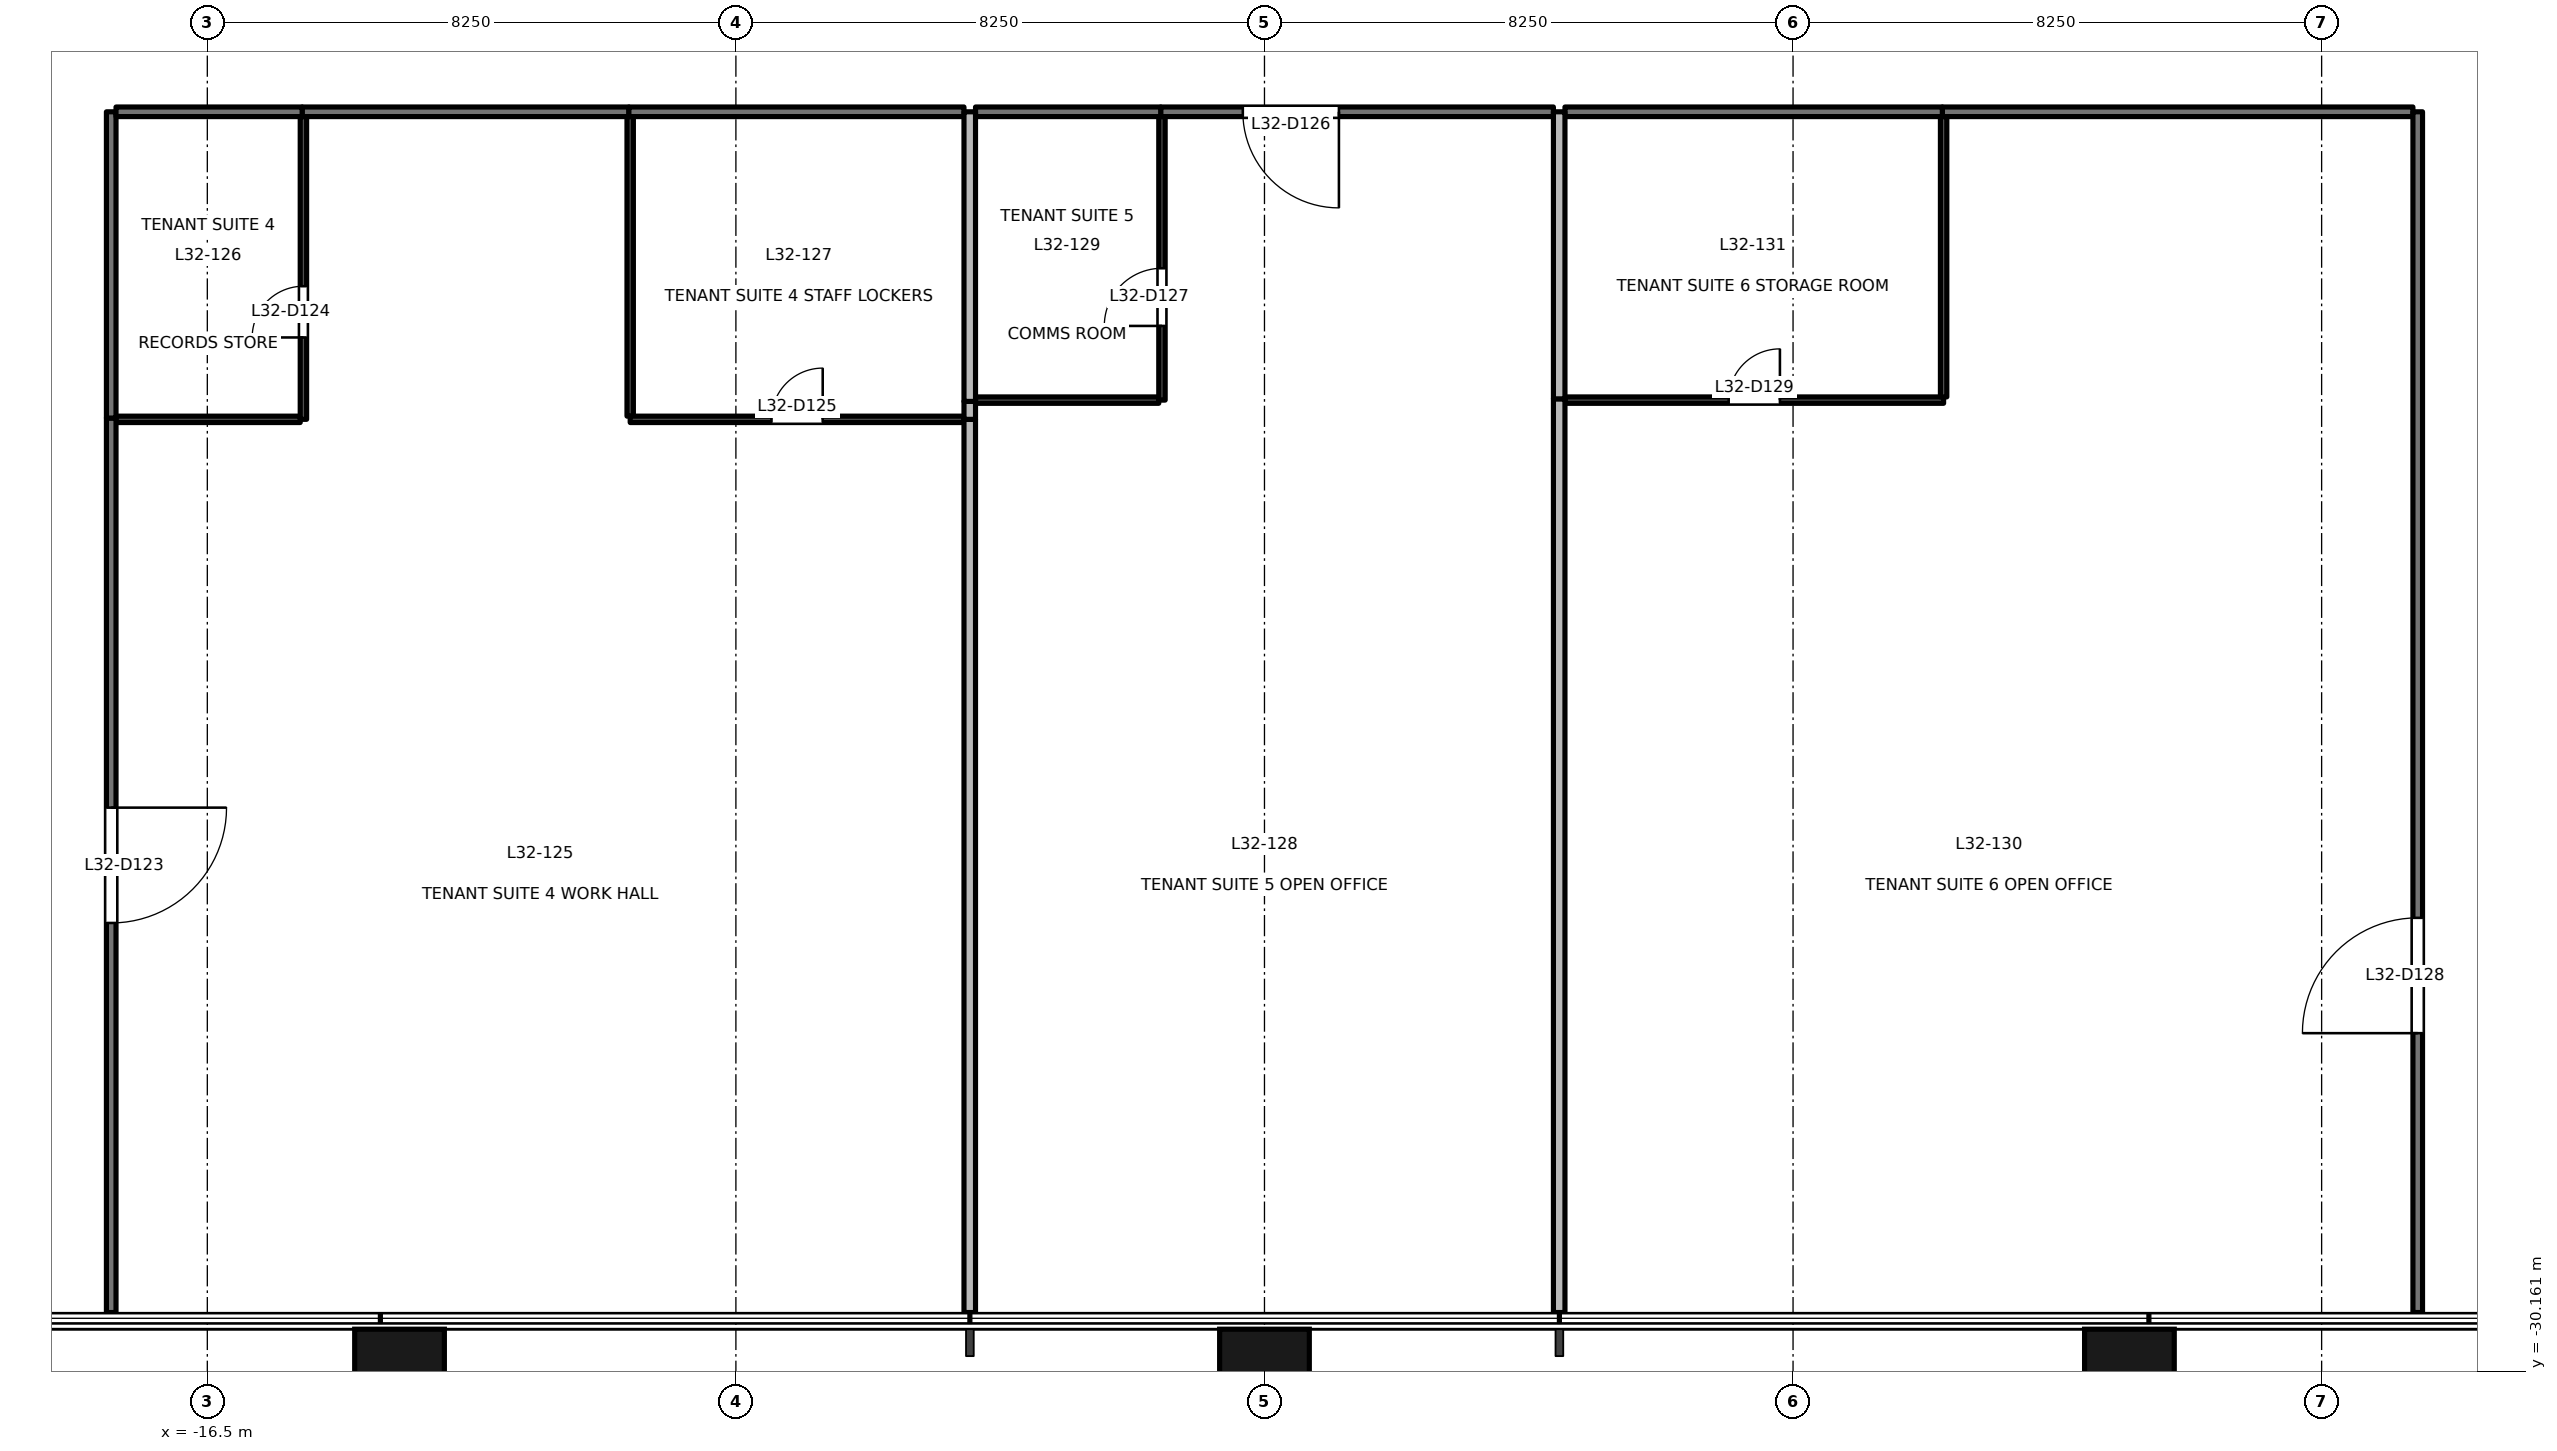
"""IFC4 building model, lengths in metres.
Left out: names, types, materials, properties, quantities, classifications, styles, units other than length and angle.
Written with IfcOpenShell. Run it as: python <this file> out.ifc"""

import sys

from ifc_helpers import new_model, si_unit, direction, frame, frame_2d, origin, origin_2d, place, context, subcontext, project, spatial, rectangle, extrude, element, fill, save


model = new_model("IFC4")
c1 = context("Model", 3, precision=1e-05, world=origin(), true_north=direction((0.0, 1.0)))
c2 = subcontext(c1, "Body", "Model", "MODEL_VIEW")
j1 = project(units=[si_unit("LENGTHUNIT", "METRE"), si_unit("PLANEANGLEUNIT", "RADIAN")], contexts=[c1])
p1 = place(None, origin())
s1 = spatial("IfcSite", under=j1, at=p1, CompositionType="ELEMENT")
p2 = place(p1, origin())
s2 = spatial("IfcBuilding", under=s1, at=p2, CompositionType="ELEMENT")
p3 = place(p2, frame((0.0, 0.0, 142.1)))
s3 = spatial("IfcBuildingStorey", under=s2, at=p3, CompositionType="ELEMENT", Elevation=142.1)
for number, where, z_axis, x_axis in (
    (1, (-13.5, -30.4, -0.2), (0.0, 0.0, 1.0), (1.0, 0.0, 0.0)),
    (2, (0.0, -30.4, -0.2), (0.0, 0.0, 1.0), (1.0, 0.0, 0.0)),
    (3, (13.5, -30.4, -0.2), (0.0, 0.0, 1.0), (1.0, 0.0, 0.0)),
):
    element("IfcColumn", number, at=place(p3, frame(where, z_axis=z_axis, x_axis=x_axis)), inside=s3, PredefinedType="COLUMN", context=c2, shape_type="SweptSolid", body=[
        extrude(rectangle(XDim=1.4, YDim=1.8, at=origin_2d()), origin(), (0.0, 0.0, 1.0), 4.0),
    ])
p4 = place(p3, frame((-18.0, -15.28, 0.0), z_axis=(0.0, 0.0, 1.0), x_axis=(0.0, -1.0, 0.0)))
e4 = element("IfcWall", 4, at=p4, inside=s3, PredefinedType="PARTITIONING", context=c2, shape_type="SweptSolid", body=[
    extrude(rectangle(XDim=13.96, YDim=0.15, at=frame_2d((6.98, 0.0))), origin(), (0.0, 0.0, 1.0), 3.8),
])
p5 = place(p4, frame((6.08, 0.0, 0.0)))
e5 = element("IfcOpeningElement", 5, at=p5, cuts=e4, PredefinedType="OPENING", context=c2, shape_type="SweptSolid", body=[
    extrude(rectangle(XDim=1.8, YDim=2.1, at=frame_2d((0.9, 1.05))), frame((0.0, 0.085, 0.0), z_axis=(0.0, -1.0, 0.0), x_axis=(1.0, 0.0, 0.0)), (0.0, 0.0, 1.0), 0.171),
])
p6 = place(p3, frame((-9.92, -10.5, 0.0), z_axis=(0.0, 0.0, 1.0), x_axis=(-1.0, 0.0, 0.0)))
e6 = element("IfcWall", 6, at=p6, inside=s3, PredefinedType="PARTITIONING", context=c2, shape_type="SweptSolid", body=[
    extrude(rectangle(XDim=5.1, YDim=0.15, at=frame_2d((2.55, 0.0))), origin(), (0.0, 0.0, 1.0), 2.9),
])
p7 = place(p3, frame((-18.0, -10.5, 0.0), z_axis=(0.0, 0.0, 1.0), x_axis=(0.0, -1.0, 0.0)))
e7 = element("IfcWall", 7, at=p7, inside=s3, PredefinedType="PARTITIONING", context=c2, shape_type="SweptSolid", body=[
    extrude(rectangle(XDim=4.78, YDim=0.15, at=frame_2d((2.39, 0.0))), origin(), (0.0, 0.0, 1.0), 3.8),
])
p8 = place(p3, frame((-15.02, -10.5, 0.0), z_axis=(0.0, 0.0, 1.0), x_axis=(-1.0, 0.0, 0.0)))
e8 = element("IfcWall", 8, at=p8, inside=s3, PredefinedType="PARTITIONING", context=c2, shape_type="SweptSolid", body=[
    extrude(rectangle(XDim=2.905, YDim=0.15, at=frame_2d((1.453, 0.0))), origin(), (0.0, 0.0, 1.0), 3.8),
])
p9 = place(p3, frame((-4.69, -10.5, 0.0), z_axis=(0.0, 0.0, 1.0), x_axis=(-1.0, 0.0, 0.0)))
e9 = element("IfcWall", 9, at=p9, inside=s3, PredefinedType="PARTITIONING", context=c2, shape_type="SweptSolid", body=[
    extrude(rectangle(XDim=5.23, YDim=0.15, at=frame_2d((2.615, 0.0))), origin(), (0.0, 0.0, 1.0), 2.9),
])
p10 = place(p3, frame((4.51, -10.5, 0.0), z_axis=(0.0, 0.0, 1.0), x_axis=(-1.0, 0.0, 0.0)))
e10 = element("IfcWall", 10, at=p10, inside=s3, PredefinedType="PARTITIONING", context=c2, shape_type="SweptSolid", body=[
    extrude(rectangle(XDim=6.13, YDim=0.15, at=frame_2d((3.065, 0.0))), origin(), (0.0, 0.0, 1.0), 2.9),
])
p11 = place(p10, frame((3.348, 0.0, 0.0)))
e11 = element("IfcOpeningElement", 11, at=p11, cuts=e10, PredefinedType="OPENING", context=c2, shape_type="SweptSolid", body=[
    extrude(rectangle(XDim=1.5, YDim=2.1, at=frame_2d((0.75, 1.05))), frame((0.0, 0.085, 0.0), z_axis=(0.0, -1.0, 0.0), x_axis=(1.0, 0.0, 0.0)), (0.0, 0.0, 1.0), 0.171),
])
p12 = place(p3, frame((-1.62, -10.5, 0.0), z_axis=(0.0, 0.0, 1.0), x_axis=(-1.0, 0.0, 0.0)))
e12 = element("IfcWall", 12, at=p12, inside=s3, PredefinedType="PARTITIONING", context=c2, shape_type="SweptSolid", body=[
    extrude(rectangle(XDim=2.89, YDim=0.15, at=frame_2d((1.445, 0.0))), origin(), (0.0, 0.0, 1.0), 2.9),
])
p13 = place(p3, frame((17.925, -10.5, 0.0), z_axis=(0.0, 0.0, 1.0), x_axis=(-1.0, 0.0, 0.0)))
e13 = element("IfcWall", 13, at=p13, inside=s3, PredefinedType="PARTITIONING", context=c2, shape_type="SweptSolid", body=[
    extrude(rectangle(XDim=7.345, YDim=0.15, at=frame_2d((3.672, 0.0))), origin(), (0.0, 0.0, 1.0), 2.9),
])
p14 = place(p3, frame((18.0, -29.24, 0.0), z_axis=(0.0, 0.0, 1.0), x_axis=(0.0, 1.0, 0.0)))
e14 = element("IfcWall", 14, at=p14, inside=s3, PredefinedType="PARTITIONING", context=c2, shape_type="SweptSolid", body=[
    extrude(rectangle(XDim=18.74, YDim=0.15, at=frame_2d((9.37, 0.0))), origin(), (0.0, 0.0, 1.0), 3.8),
])
p15 = place(p14, frame((4.36, 0.0, 0.0)))
e15 = element("IfcOpeningElement", 15, at=p15, cuts=e14, PredefinedType="OPENING", context=c2, shape_type="SweptSolid", body=[
    extrude(rectangle(XDim=1.8, YDim=2.1, at=frame_2d((0.9, 1.05))), frame((0.0, 0.085, 0.0), z_axis=(0.0, -1.0, 0.0), x_axis=(1.0, 0.0, 0.0)), (0.0, 0.0, 1.0), 0.171),
])
p16 = place(p3, frame((10.58, -10.5, 0.0), z_axis=(0.0, 0.0, 1.0), x_axis=(-1.0, 0.0, 0.0)))
e16 = element("IfcWall", 16, at=p16, inside=s3, PredefinedType="PARTITIONING", context=c2, shape_type="SweptSolid", body=[
    extrude(rectangle(XDim=5.89, YDim=0.15, at=frame_2d((2.945, 0.0))), origin(), (0.0, 0.0, 1.0), 2.9),
])
p17 = place(p3, frame((-17.925, -15.3, 0.0), z_axis=(0.0, 0.0, 1.0), x_axis=(1.0, 0.0, 0.0)))
e17 = element("IfcWall", 17, at=p17, inside=s3, PredefinedType="PARTITIONING", context=c2, shape_type="SweptSolid", body=[
    extrude(rectangle(XDim=2.875, YDim=0.1, at=frame_2d((1.438, 0.0))), origin(), (0.0, 0.0, 1.0), 3.8),
])
p18 = place(p3, frame((-15.0, -15.3, 0.0), z_axis=(0.0, 0.0, 1.0), x_axis=(0.0, 1.0, 0.0)))
e18 = element("IfcWall", 18, at=p18, inside=s3, PredefinedType="PARTITIONING", context=c2, shape_type="SweptSolid", body=[
    extrude(rectangle(XDim=4.725, YDim=0.1, at=frame_2d((2.363, 0.0))), origin(), (0.0, 0.0, 1.0), 3.8),
])
p19 = place(p18, frame((1.278, 0.0, 0.0)))
e19 = element("IfcOpeningElement", 19, at=p19, cuts=e18, PredefinedType="OPENING", context=c2, shape_type="SweptSolid", body=[
    extrude(rectangle(XDim=0.8, YDim=2.1, at=frame_2d((0.4, 1.05))), frame((0.0, 0.061, 0.0), z_axis=(0.0, -1.0, 0.0), x_axis=(1.0, 0.0, 0.0)), (0.0, 0.0, 1.0), 0.121),
])
p20 = place(p3, frame((-9.9, -10.575, 0.0), z_axis=(0.0, 0.0, 1.0), x_axis=(0.0, -1.0, 0.0)))
e20 = element("IfcWall", 20, at=p20, inside=s3, PredefinedType="PARTITIONING", context=c2, shape_type="SweptSolid", body=[
    extrude(rectangle(XDim=4.675, YDim=0.1, at=frame_2d((2.337, 0.0))), origin(), (0.0, 0.0, 1.0), 3.8),
])
p21 = place(p3, frame((-9.9, -15.3, 0.0), z_axis=(0.0, 0.0, 1.0), x_axis=(1.0, 0.0, 0.0)))
e21 = element("IfcWall", 21, at=p21, inside=s3, PredefinedType="PARTITIONING", context=c2, shape_type="SweptSolid", body=[
    extrude(rectangle(XDim=5.21, YDim=0.1, at=frame_2d((2.605, 0.0))), origin(), (0.0, 0.0, 1.0), 2.9),
])
p22 = place(p21, frame((2.205, 0.0, 0.0)))
e22 = element("IfcOpeningElement", 22, at=p22, cuts=e21, PredefinedType="OPENING", context=c2, shape_type="SweptSolid", body=[
    extrude(rectangle(XDim=0.8, YDim=2.1, at=frame_2d((0.4, 1.05))), frame((0.0, 0.061, 0.0), z_axis=(0.0, -1.0, 0.0), x_axis=(1.0, 0.0, 0.0)), (0.0, 0.0, 1.0), 0.121),
])
p23 = place(p3, frame((-4.6, -15.3, 0.0), z_axis=(0.0, 0.0, 1.0), x_axis=(0.0, -1.0, 0.0)))
e23 = element("IfcWall", 23, at=p23, inside=s3, PredefinedType="PARTITIONING", context=c2, shape_type="SweptSolid", body=[
    extrude(rectangle(XDim=13.94, YDim=0.18, at=frame_2d((6.97, 0.0))), origin(), (0.0, 0.0, 1.0), 2.9),
])
p24 = place(p3, frame((-4.6, -15.02, 0.0), z_axis=(0.0, 0.0, 1.0), x_axis=(0.0, -1.0, 0.0)))
e24 = element("IfcWall", 24, at=p24, inside=s3, PredefinedType="PARTITIONING", context=c2, shape_type="SweptSolid", body=[
    extrude(rectangle(XDim=0.28, YDim=0.18, at=frame_2d((0.14, 0.0))), origin(), (0.0, 0.0, 1.0), 2.9),
])
p25 = place(p3, frame((-4.6, -10.5, 0.0), z_axis=(0.0, 0.0, 1.0), x_axis=(0.0, -1.0, 0.0)))
e25 = element("IfcWall", 25, at=p25, inside=s3, PredefinedType="PARTITIONING", context=c2, shape_type="SweptSolid", body=[
    extrude(rectangle(XDim=4.52, YDim=0.18, at=frame_2d((2.26, 0.0))), origin(), (0.0, 0.0, 1.0), 2.9),
])
p26 = place(p3, frame((-4.51, -15.0, 0.0), z_axis=(0.0, 0.0, 1.0), x_axis=(1.0, 0.0, 0.0)))
e26 = element("IfcWall", 26, at=p26, inside=s3, PredefinedType="PARTITIONING", context=c2, shape_type="SweptSolid", body=[
    extrude(rectangle(XDim=2.86, YDim=0.1, at=frame_2d((1.43, 0.0))), origin(), (0.0, 0.0, 1.0), 2.9),
])
p27 = place(p3, frame((-1.6, -15.0, 0.0), z_axis=(0.0, 0.0, 1.0), x_axis=(0.0, 1.0, 0.0)))
e27 = element("IfcWall", 27, at=p27, inside=s3, PredefinedType="PARTITIONING", context=c2, shape_type="SweptSolid", body=[
    extrude(rectangle(XDim=4.425, YDim=0.1, at=frame_2d((2.212, 0.0))), origin(), (0.0, 0.0, 1.0), 3.8),
])
p28 = place(p27, frame((1.158, 0.0, 0.0)))
e28 = element("IfcOpeningElement", 28, at=p28, cuts=e27, PredefinedType="OPENING", context=c2, shape_type="SweptSolid", body=[
    extrude(rectangle(XDim=0.9, YDim=2.1, at=frame_2d((0.45, 1.05))), frame((0.0, 0.061, 0.0), z_axis=(0.0, -1.0, 0.0), x_axis=(1.0, 0.0, 0.0)), (0.0, 0.0, 1.0), 0.121),
])
p29 = place(p3, frame((4.6, -14.98, 0.0), z_axis=(0.0, 0.0, 1.0), x_axis=(0.0, -1.0, 0.0)))
e29 = element("IfcWall", 29, at=p29, inside=s3, PredefinedType="PARTITIONING", context=c2, shape_type="SweptSolid", body=[
    extrude(rectangle(XDim=14.26, YDim=0.18, at=frame_2d((7.13, 0.0))), origin(), (0.0, 0.0, 1.0), 2.9),
])
p30 = place(p3, frame((4.6, -10.5, 0.0), z_axis=(0.0, 0.0, 1.0), x_axis=(0.0, -1.0, 0.0)))
e30 = element("IfcWall", 30, at=p30, inside=s3, PredefinedType="PARTITIONING", context=c2, shape_type="SweptSolid", body=[
    extrude(rectangle(XDim=4.48, YDim=0.18, at=frame_2d((2.24, 0.0))), origin(), (0.0, 0.0, 1.0), 2.9),
])
p31 = place(p3, frame((4.69, -15.0, 0.0), z_axis=(0.0, 0.0, 1.0), x_axis=(1.0, 0.0, 0.0)))
e31 = element("IfcWall", 31, at=p31, inside=s3, PredefinedType="PARTITIONING", context=c2, shape_type="SweptSolid", body=[
    extrude(rectangle(XDim=5.91, YDim=0.1, at=frame_2d((2.955, 0.0))), origin(), (0.0, 0.0, 1.0), 2.9),
])
p32 = place(p31, frame((2.555, 0.0, 0.0)))
e32 = element("IfcOpeningElement", 32, at=p32, cuts=e31, PredefinedType="OPENING", context=c2, shape_type="SweptSolid", body=[
    extrude(rectangle(XDim=0.8, YDim=2.1, at=frame_2d((0.4, 1.05))), frame((0.0, 0.061, 0.0), z_axis=(0.0, -1.0, 0.0), x_axis=(1.0, 0.0, 0.0)), (0.0, 0.0, 1.0), 0.121),
])
p33 = place(p3, frame((10.6, -14.95, 0.0), z_axis=(0.0, 0.0, 1.0), x_axis=(0.0, 1.0, 0.0)))
e33 = element("IfcWall", 33, at=p33, inside=s3, PredefinedType="PARTITIONING", context=c2, shape_type="SweptSolid", body=[
    extrude(rectangle(XDim=4.375, YDim=0.1, at=frame_2d((2.188, 0.0))), origin(), (0.0, 0.0, 1.0), 3.8),
])
p34 = place(p5, origin())
e34 = element("IfcDoor", 34, at=p34, inside=s3, OperationType="DOUBLE_DOOR_SINGLE_SWING", PredefinedType="DOOR", context=c2, shape_type="SweptSolid", body=[
    extrude(rectangle(XDim=1.8, YDim=2.1, at=frame_2d((0.9, 1.05))), frame((0.0, 0.025, 0.0), z_axis=(0.0, -1.0, 0.0), x_axis=(1.0, 0.0, 0.0)), (0.0, 0.0, 1.0), 0.05),
])
fill(e5, e34)
p35 = place(p19, origin())
e35 = element("IfcDoor", 35, at=p35, inside=s3, OperationType="SINGLE_SWING_LEFT", PredefinedType="DOOR", context=c2, shape_type="SweptSolid", body=[
    extrude(rectangle(XDim=0.8, YDim=2.1, at=frame_2d((0.4, 1.05))), frame((0.0, 0.025, 0.0), z_axis=(0.0, -1.0, 0.0), x_axis=(1.0, 0.0, 0.0)), (0.0, 0.0, 1.0), 0.05),
])
fill(e19, e35)
p36 = place(p22, origin())
e36 = element("IfcDoor", 36, at=p36, inside=s3, OperationType="SINGLE_SWING_RIGHT", PredefinedType="DOOR", context=c2, shape_type="SweptSolid", body=[
    extrude(rectangle(XDim=0.8, YDim=2.1, at=frame_2d((0.4, 1.05))), frame((0.0, 0.025, 0.0), z_axis=(0.0, -1.0, 0.0), x_axis=(1.0, 0.0, 0.0)), (0.0, 0.0, 1.0), 0.05),
])
fill(e22, e36)
p37 = place(p11, origin())
e37 = element("IfcDoor", 37, at=p37, inside=s3, OperationType="DOUBLE_DOOR_SINGLE_SWING", PredefinedType="DOOR", context=c2, shape_type="SweptSolid", body=[
    extrude(rectangle(XDim=1.5, YDim=2.1, at=frame_2d((0.75, 1.05))), frame((0.0, 0.025, 0.0), z_axis=(0.0, -1.0, 0.0), x_axis=(1.0, 0.0, 0.0)), (0.0, 0.0, 1.0), 0.05),
])
fill(e11, e37)
p38 = place(p28, origin())
e38 = element("IfcDoor", 38, at=p38, inside=s3, OperationType="SINGLE_SWING_LEFT", PredefinedType="DOOR", context=c2, shape_type="SweptSolid", body=[
    extrude(rectangle(XDim=0.9, YDim=2.1, at=frame_2d((0.45, 1.05))), frame((0.0, 0.025, 0.0), z_axis=(0.0, -1.0, 0.0), x_axis=(1.0, 0.0, 0.0)), (0.0, 0.0, 1.0), 0.05),
])
fill(e28, e38)
p39 = place(p15, origin())
e39 = element("IfcDoor", 39, at=p39, inside=s3, OperationType="DOUBLE_DOOR_SINGLE_SWING", PredefinedType="DOOR", context=c2, shape_type="SweptSolid", body=[
    extrude(rectangle(XDim=1.8, YDim=2.1, at=frame_2d((0.9, 1.05))), frame((0.0, 0.025, 0.0), z_axis=(0.0, -1.0, 0.0), x_axis=(1.0, 0.0, 0.0)), (0.0, 0.0, 1.0), 0.05),
])
fill(e15, e39)
p40 = place(p32, origin())
e40 = element("IfcDoor", 40, at=p40, inside=s3, OperationType="SINGLE_SWING_RIGHT", PredefinedType="DOOR", context=c2, shape_type="SweptSolid", body=[
    extrude(rectangle(XDim=0.8, YDim=2.1, at=frame_2d((0.4, 1.05))), frame((0.0, 0.025, 0.0), z_axis=(0.0, -1.0, 0.0), x_axis=(1.0, 0.0, 0.0)), (0.0, 0.0, 1.0), 0.05),
])
fill(e32, e40)
save(model, sys.argv[1])
